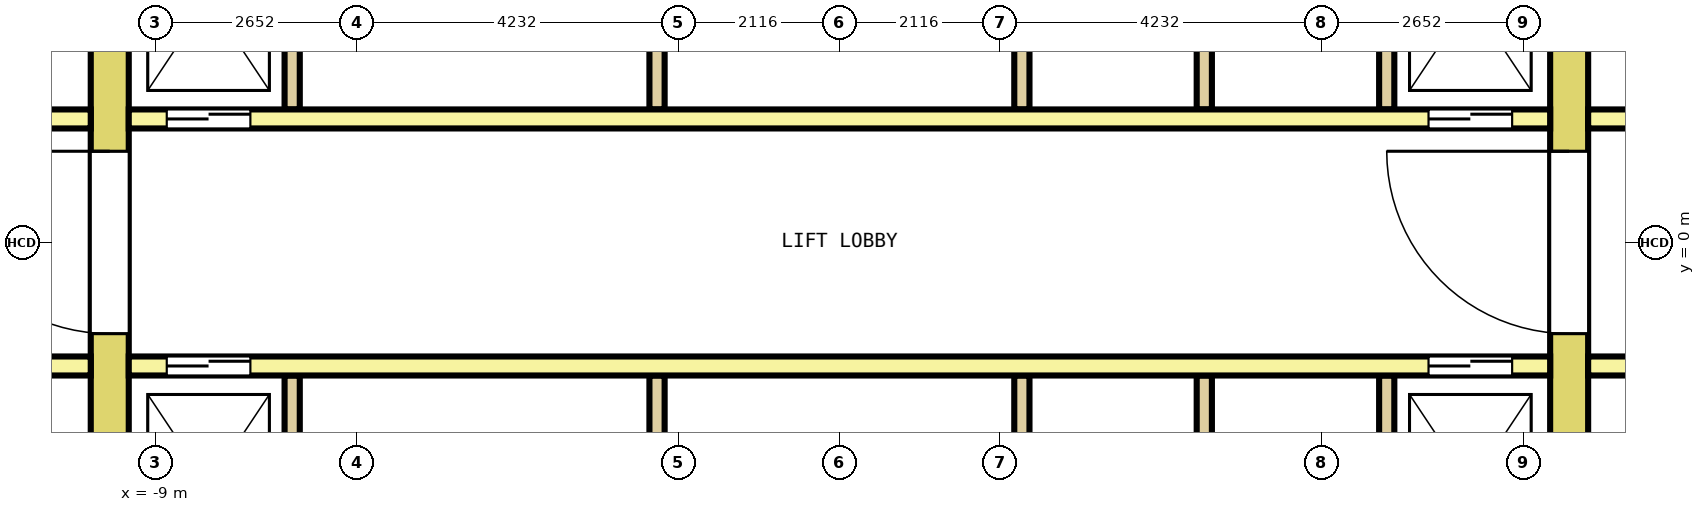
"""IFC4 building model, lengths in metres.
Left out: names, types, materials, properties, quantities, classifications, styles, units other than length and angle.
Written with IfcOpenShell. Run it as: python <this file> out.ifc"""

import sys

from ifc_helpers import new_model, si_unit, direction, frame, frame_2d, origin, place, context, subcontext, project, spatial, rectangle, extrude, element, fill, save


model = new_model("IFC4")
c1 = context("Model", 3, precision=1e-05, world=origin(), true_north=direction((0.0, 1.0)))
c2 = subcontext(c1, "Body", "Model", "MODEL_VIEW")
j1 = project(units=[si_unit("LENGTHUNIT", "METRE"), si_unit("PLANEANGLEUNIT", "RADIAN")], contexts=[c1])
p1 = place(None, origin())
s1 = spatial("IfcSite", under=j1, at=p1, CompositionType="ELEMENT")
p2 = place(p1, origin())
s2 = spatial("IfcBuilding", under=s1, at=p2, CompositionType="ELEMENT")
p3 = place(p2, frame((0.0, 0.0, 41.0)))
s3 = spatial("IfcBuildingStorey", under=s2, at=p3, CompositionType="ELEMENT", Elevation=41.0)
p4 = place(p3, frame((-9.6, -7.7, 0.0), z_axis=(0.0, 0.0, 1.0), x_axis=(0.0, 1.0, 0.0)))
e1 = element("IfcWall", 1, at=p4, inside=s3, PredefinedType="SHEAR", context=c2, shape_type="SweptSolid", body=[
    extrude(rectangle(XDim=15.4, YDim=0.5, at=frame_2d((7.7, 0.0))), origin(), (0.0, 0.0, 1.0), 4.1),
])
p5 = place(p4, frame((6.5, 0.0, 0.0)))
e2 = element("IfcOpeningElement", 2, at=p5, cuts=e1, PredefinedType="OPENING", context=c2, shape_type="SweptSolid", body=[
    extrude(rectangle(XDim=2.4, YDim=2.1, at=frame_2d((1.2, 1.05))), frame((0.0, 0.26, 0.0), z_axis=(0.0, -1.0, 0.0), x_axis=(1.0, 0.0, 0.0)), (0.0, 0.0, 1.0), 0.52),
])
p6 = place(p4, frame((13.4, 0.0, 0.0)))
e3 = element("IfcOpeningElement", 3, at=p6, cuts=e1, PredefinedType="OPENING", context=c2, shape_type="SweptSolid", body=[
    extrude(rectangle(XDim=1.2, YDim=2.1, at=frame_2d((0.6, 1.05))), frame((0.0, 0.26, 0.0), z_axis=(0.0, -1.0, 0.0), x_axis=(1.0, 0.0, 0.0)), (0.0, 0.0, 1.0), 0.52),
])
p7 = place(p4, frame((0.8, 0.0, 0.0)))
e4 = element("IfcOpeningElement", 4, at=p7, cuts=e1, PredefinedType="OPENING", context=c2, shape_type="SweptSolid", body=[
    extrude(rectangle(XDim=1.2, YDim=2.1, at=frame_2d((0.6, 1.05))), frame((0.0, 0.26, 0.0), z_axis=(0.0, -1.0, 0.0), x_axis=(1.0, 0.0, 0.0)), (0.0, 0.0, 1.0), 0.52),
])
p8 = place(p3, frame((9.6, -7.7, 0.0), z_axis=(0.0, 0.0, 1.0), x_axis=(0.0, 1.0, 0.0)))
e5 = element("IfcWall", 5, at=p8, inside=s3, PredefinedType="SHEAR", context=c2, shape_type="SweptSolid", body=[
    extrude(rectangle(XDim=15.4, YDim=0.5, at=frame_2d((7.7, 0.0))), origin(), (0.0, 0.0, 1.0), 4.1),
])
p9 = place(p8, frame((6.5, 0.0, 0.0)))
e6 = element("IfcOpeningElement", 6, at=p9, cuts=e5, PredefinedType="OPENING", context=c2, shape_type="SweptSolid", body=[
    extrude(rectangle(XDim=2.4, YDim=2.1, at=frame_2d((1.2, 1.05))), frame((0.0, 0.26, 0.0), z_axis=(0.0, -1.0, 0.0), x_axis=(1.0, 0.0, 0.0)), (0.0, 0.0, 1.0), 0.52),
])
p10 = place(p8, frame((13.4, 0.0, 0.0)))
e7 = element("IfcOpeningElement", 7, at=p10, cuts=e5, PredefinedType="OPENING", context=c2, shape_type="SweptSolid", body=[
    extrude(rectangle(XDim=1.2, YDim=2.1, at=frame_2d((0.6, 1.05))), frame((0.0, 0.26, 0.0), z_axis=(0.0, -1.0, 0.0), x_axis=(1.0, 0.0, 0.0)), (0.0, 0.0, 1.0), 0.52),
])
p11 = place(p8, frame((0.9, 0.0, 0.0)))
e8 = element("IfcOpeningElement", 8, at=p11, cuts=e5, PredefinedType="OPENING", context=c2, shape_type="SweptSolid", body=[
    extrude(rectangle(XDim=1.0, YDim=2.1, at=frame_2d((0.5, 1.05))), frame((0.0, 0.26, 0.0), z_axis=(0.0, -1.0, 0.0), x_axis=(1.0, 0.0, 0.0)), (0.0, 0.0, 1.0), 0.52),
])
p12 = place(p3, frame((-12.75, 1.625, 0.0), z_axis=(0.0, 0.0, 1.0), x_axis=(1.0, 0.0, 0.0)))
e9 = element("IfcWall", 9, at=p12, inside=s3, PredefinedType="SOLIDWALL", context=c2, shape_type="SweptSolid", body=[
    extrude(rectangle(XDim=2.9, YDim=0.25, at=frame_2d((1.45, 0.0))), origin(), (0.0, 0.0, 1.0), 4.1),
])
p13 = place(p12, frame((0.9, 0.0, 0.0)))
e10 = element("IfcOpeningElement", 10, at=p13, cuts=e9, PredefinedType="OPENING", context=c2, shape_type="SweptSolid", body=[
    extrude(rectangle(XDim=1.1, YDim=2.1, at=frame_2d((0.55, 1.05))), frame((0.0, 0.135, 0.0), z_axis=(0.0, -1.0, 0.0), x_axis=(1.0, 0.0, 0.0)), (0.0, 0.0, 1.0), 0.27),
])
p14 = place(p3, frame((-9.35, 1.625, 0.0), z_axis=(0.0, 0.0, 1.0), x_axis=(1.0, 0.0, 0.0)))
e11 = element("IfcWall", 11, at=p14, inside=s3, PredefinedType="SOLIDWALL", context=c2, shape_type="SweptSolid", body=[
    extrude(rectangle(XDim=18.7, YDim=0.25, at=frame_2d((9.35, 0.0))), origin(), (0.0, 0.0, 1.0), 4.1),
])
p15 = place(p14, frame((0.5, 0.0, 0.0)))
e12 = element("IfcOpeningElement", 12, at=p15, cuts=e11, PredefinedType="OPENING", context=c2, shape_type="SweptSolid", body=[
    extrude(rectangle(XDim=1.1, YDim=2.1, at=frame_2d((0.55, 1.05))), frame((0.0, 0.135, 0.0), z_axis=(0.0, -1.0, 0.0), x_axis=(1.0, 0.0, 0.0)), (0.0, 0.0, 1.0), 0.27),
])
p16 = place(p14, frame((17.1, 0.0, 0.0)))
e13 = element("IfcOpeningElement", 13, at=p16, cuts=e11, PredefinedType="OPENING", context=c2, shape_type="SweptSolid", body=[
    extrude(rectangle(XDim=1.1, YDim=2.1, at=frame_2d((0.55, 1.05))), frame((0.0, 0.135, 0.0), z_axis=(0.0, -1.0, 0.0), x_axis=(1.0, 0.0, 0.0)), (0.0, 0.0, 1.0), 0.27),
])
p17 = place(p3, frame((9.85, 1.625, 0.0), z_axis=(0.0, 0.0, 1.0), x_axis=(1.0, 0.0, 0.0)))
e14 = element("IfcWall", 14, at=p17, inside=s3, PredefinedType="SOLIDWALL", context=c2, shape_type="SweptSolid", body=[
    extrude(rectangle(XDim=2.9, YDim=0.25, at=frame_2d((1.45, 0.0))), origin(), (0.0, 0.0, 1.0), 4.1),
])
p18 = place(p17, frame((0.9, 0.0, 0.0)))
e15 = element("IfcOpeningElement", 15, at=p18, cuts=e14, PredefinedType="OPENING", context=c2, shape_type="SweptSolid", body=[
    extrude(rectangle(XDim=1.1, YDim=2.1, at=frame_2d((0.55, 1.05))), frame((0.0, 0.135, 0.0), z_axis=(0.0, -1.0, 0.0), x_axis=(1.0, 0.0, 0.0)), (0.0, 0.0, 1.0), 0.27),
])
for number, where, z_axis, x_axis in (
    (16, (-7.2, 1.75, 0.0), (0.0, 0.0, 1.0), (0.0, 1.0, 0.0)),
    (17, (-2.4, 1.75, 0.0), (0.0, 0.0, 1.0), (0.0, 1.0, 0.0)),
    (18, (2.4, 1.75, 0.0), (0.0, 0.0, 1.0), (0.0, 1.0, 0.0)),
    (19, (4.8, 1.75, 0.0), (0.0, 0.0, 1.0), (0.0, 1.0, 0.0)),
    (20, (7.2, 1.75, 0.0), (0.0, 0.0, 1.0), (0.0, 1.0, 0.0)),
):
    element("IfcWall", number, at=place(p3, frame(where, z_axis=z_axis, x_axis=x_axis)), inside=s3, PredefinedType="SOLIDWALL", context=c2, shape_type="SweptSolid", body=[
        extrude(rectangle(XDim=2.9, YDim=0.2, at=frame_2d((1.45, 0.0))), origin(), (0.0, 0.0, 1.0), 4.1),
    ])
p19 = place(p3, frame((-12.75, -1.625, 0.0), z_axis=(0.0, 0.0, 1.0), x_axis=(1.0, 0.0, 0.0)))
e21 = element("IfcWall", 21, at=p19, inside=s3, PredefinedType="SOLIDWALL", context=c2, shape_type="SweptSolid", body=[
    extrude(rectangle(XDim=2.9, YDim=0.25, at=frame_2d((1.45, 0.0))), origin(), (0.0, 0.0, 1.0), 4.1),
])
p20 = place(p19, frame((0.9, 0.0, 0.0)))
e22 = element("IfcOpeningElement", 22, at=p20, cuts=e21, PredefinedType="OPENING", context=c2, shape_type="SweptSolid", body=[
    extrude(rectangle(XDim=1.1, YDim=2.1, at=frame_2d((0.55, 1.05))), frame((0.0, 0.135, 0.0), z_axis=(0.0, -1.0, 0.0), x_axis=(1.0, 0.0, 0.0)), (0.0, 0.0, 1.0), 0.27),
])
p21 = place(p3, frame((-9.35, -1.625, 0.0), z_axis=(0.0, 0.0, 1.0), x_axis=(1.0, 0.0, 0.0)))
e23 = element("IfcWall", 23, at=p21, inside=s3, PredefinedType="SOLIDWALL", context=c2, shape_type="SweptSolid", body=[
    extrude(rectangle(XDim=18.7, YDim=0.25, at=frame_2d((9.35, 0.0))), origin(), (0.0, 0.0, 1.0), 4.1),
])
p22 = place(p21, frame((0.5, 0.0, 0.0)))
e24 = element("IfcOpeningElement", 24, at=p22, cuts=e23, PredefinedType="OPENING", context=c2, shape_type="SweptSolid", body=[
    extrude(rectangle(XDim=1.1, YDim=2.1, at=frame_2d((0.55, 1.05))), frame((0.0, 0.135, 0.0), z_axis=(0.0, -1.0, 0.0), x_axis=(1.0, 0.0, 0.0)), (0.0, 0.0, 1.0), 0.27),
])
p23 = place(p21, frame((17.1, 0.0, 0.0)))
e25 = element("IfcOpeningElement", 25, at=p23, cuts=e23, PredefinedType="OPENING", context=c2, shape_type="SweptSolid", body=[
    extrude(rectangle(XDim=1.1, YDim=2.1, at=frame_2d((0.55, 1.05))), frame((0.0, 0.135, 0.0), z_axis=(0.0, -1.0, 0.0), x_axis=(1.0, 0.0, 0.0)), (0.0, 0.0, 1.0), 0.27),
])
p24 = place(p3, frame((9.85, -1.625, 0.0), z_axis=(0.0, 0.0, 1.0), x_axis=(1.0, 0.0, 0.0)))
e26 = element("IfcWall", 26, at=p24, inside=s3, PredefinedType="SOLIDWALL", context=c2, shape_type="SweptSolid", body=[
    extrude(rectangle(XDim=2.9, YDim=0.25, at=frame_2d((1.45, 0.0))), origin(), (0.0, 0.0, 1.0), 4.1),
])
p25 = place(p24, frame((0.9, 0.0, 0.0)))
e27 = element("IfcOpeningElement", 27, at=p25, cuts=e26, PredefinedType="OPENING", context=c2, shape_type="SweptSolid", body=[
    extrude(rectangle(XDim=1.1, YDim=2.1, at=frame_2d((0.55, 1.05))), frame((0.0, 0.135, 0.0), z_axis=(0.0, -1.0, 0.0), x_axis=(1.0, 0.0, 0.0)), (0.0, 0.0, 1.0), 0.27),
])
for number, where, z_axis, x_axis in (
    (28, (-7.2, -4.65, 0.0), (0.0, 0.0, 1.0), (0.0, 1.0, 0.0)),
    (29, (-2.4, -4.65, 0.0), (0.0, 0.0, 1.0), (0.0, 1.0, 0.0)),
    (30, (2.4, -4.65, 0.0), (0.0, 0.0, 1.0), (0.0, 1.0, 0.0)),
    (31, (4.8, -4.65, 0.0), (0.0, 0.0, 1.0), (0.0, 1.0, 0.0)),
    (32, (7.2, -4.65, 0.0), (0.0, 0.0, 1.0), (0.0, 1.0, 0.0)),
):
    element("IfcWall", number, at=place(p3, frame(where, z_axis=z_axis, x_axis=x_axis)), inside=s3, PredefinedType="SOLIDWALL", context=c2, shape_type="SweptSolid", body=[
        extrude(rectangle(XDim=2.9, YDim=0.2, at=frame_2d((1.45, 0.0))), origin(), (0.0, 0.0, 1.0), 4.1),
    ])
p26 = place(p15, origin())
e33 = element("IfcDoor", 33, at=p26, inside=s3, OperationType="DOUBLE_DOOR_SLIDING", PredefinedType="DOOR", context=c2, shape_type="SweptSolid", body=[
    extrude(rectangle(XDim=1.1, YDim=2.1, at=frame_2d((0.55, 1.05))), frame((0.0, 0.075, 0.0), z_axis=(0.0, -1.0, 0.0), x_axis=(1.0, 0.0, 0.0)), (0.0, 0.0, 1.0), 0.15),
])
fill(e12, e33)
p27 = place(p16, origin())
e34 = element("IfcDoor", 34, at=p27, inside=s3, OperationType="DOUBLE_DOOR_SLIDING", PredefinedType="DOOR", context=c2, shape_type="SweptSolid", body=[
    extrude(rectangle(XDim=1.1, YDim=2.1, at=frame_2d((0.55, 1.05))), frame((0.0, 0.075, 0.0), z_axis=(0.0, -1.0, 0.0), x_axis=(1.0, 0.0, 0.0)), (0.0, 0.0, 1.0), 0.15),
])
fill(e13, e34)
p28 = place(p22, origin())
e35 = element("IfcDoor", 35, at=p28, inside=s3, OperationType="DOUBLE_DOOR_SLIDING", PredefinedType="DOOR", context=c2, shape_type="SweptSolid", body=[
    extrude(rectangle(XDim=1.1, YDim=2.1, at=frame_2d((0.55, 1.05))), frame((0.0, 0.075, 0.0), z_axis=(0.0, -1.0, 0.0), x_axis=(1.0, 0.0, 0.0)), (0.0, 0.0, 1.0), 0.15),
])
fill(e24, e35)
p29 = place(p23, origin())
e36 = element("IfcDoor", 36, at=p29, inside=s3, OperationType="DOUBLE_DOOR_SLIDING", PredefinedType="DOOR", context=c2, shape_type="SweptSolid", body=[
    extrude(rectangle(XDim=1.1, YDim=2.1, at=frame_2d((0.55, 1.05))), frame((0.0, 0.075, 0.0), z_axis=(0.0, -1.0, 0.0), x_axis=(1.0, 0.0, 0.0)), (0.0, 0.0, 1.0), 0.15),
])
fill(e25, e36)
p30 = place(p5, origin())
e37 = element("IfcDoor", 37, at=p30, inside=s3, OperationType="DOUBLE_DOOR_SINGLE_SWING", PredefinedType="DOOR", context=c2, shape_type="SweptSolid", body=[
    extrude(rectangle(XDim=2.4, YDim=2.1, at=frame_2d((1.2, 1.05))), frame((0.0, 0.2, 0.0), z_axis=(0.0, -1.0, 0.0), x_axis=(1.0, 0.0, 0.0)), (0.0, 0.0, 1.0), 0.4),
])
fill(e2, e37)
p31 = place(p9, origin())
e38 = element("IfcDoor", 38, at=p31, inside=s3, OperationType="DOUBLE_DOOR_SINGLE_SWING", PredefinedType="DOOR", context=c2, shape_type="SweptSolid", body=[
    extrude(rectangle(XDim=2.4, YDim=2.1, at=frame_2d((1.2, 1.05))), frame((0.0, 0.2, 0.0), z_axis=(0.0, -1.0, 0.0), x_axis=(1.0, 0.0, 0.0)), (0.0, 0.0, 1.0), 0.4),
])
fill(e6, e38)
save(model, sys.argv[1])
